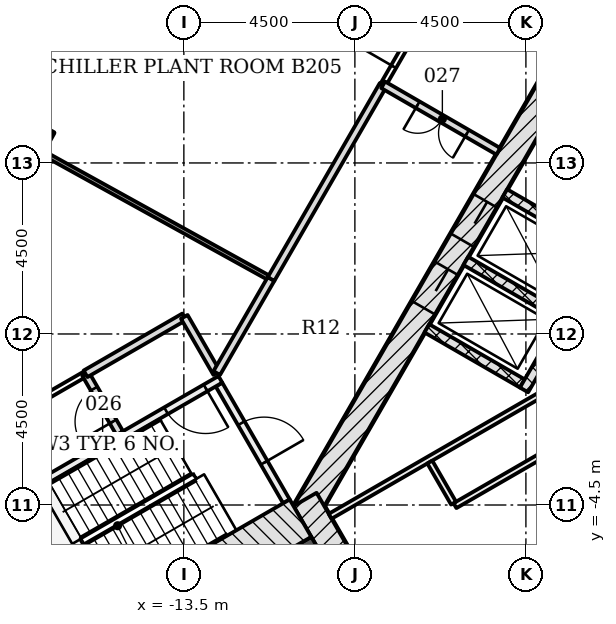
"""IFC4 building model, lengths in metres.
Left out: names, types, materials, properties, quantities, classifications, styles, units other than length and angle.
Written with IfcOpenShell. Run it as: python <this file> out.ifc"""

import sys

from ifc_helpers import new_model, si_unit, direction, frame, frame_2d, origin, origin_2d, place, context, subcontext, project, spatial, polyline, rectangle, outline, extrude, element, fill, save


model = new_model("IFC4")
c1 = context("Model", 3, precision=1e-05, world=origin(), true_north=direction((0.0, 1.0)))
c2 = subcontext(c1, "Body", "Model", "MODEL_VIEW")
j1 = project(units=[si_unit("LENGTHUNIT", "METRE"), si_unit("PLANEANGLEUNIT", "RADIAN")], contexts=[c1])
p1 = place(None, origin())
s1 = spatial("IfcSite", under=j1, at=p1, CompositionType="ELEMENT")
p2 = place(p1, origin())
s2 = spatial("IfcBuilding", under=s1, at=p2, CompositionType="ELEMENT")
p3 = place(p2, frame((0.0, 0.0, -9.0)))
s3 = spatial("IfcBuildingStorey", under=s2, at=p3, CompositionType="ELEMENT", Elevation=-9.0)
p4 = place(p3, frame((-17.739, 5.058, -0.3), z_axis=(0.0, 0.0, 1.0), x_axis=(-0.875152760281, 0.483846717641, 0.0)))
e1 = element("IfcColumn", 1, at=p4, inside=s3, PredefinedType="COLUMN", context=c2, shape_type="SweptSolid", body=[
    extrude(rectangle(XDim=1.2, YDim=1.2, at=origin_2d()), origin(), (0.0, 0.0, 1.0), 4.5),
])
p5 = place(p3, frame((-1.083, 11.281, -0.3), z_axis=(0.0, 0.0, 1.0), x_axis=(-0.500001446645, -0.866024568562, 0.0)))
e2 = element("IfcWall", 2, at=p5, inside=s3, PredefinedType="SHEAR", context=c2, shape_type="SweptSolid", body=[
    extrude(rectangle(XDim=18.458, YDim=0.7, at=frame_2d((9.229, 0.0))), origin(), (0.0, 0.0, 1.0), 4.5),
])
p6 = place(p5, frame((8.979, 0.0, 0.3)))
e3 = element("IfcOpeningElement", 3, at=p6, cuts=e2, PredefinedType="OPENING", context=c2, shape_type="SweptSolid", body=[
    extrude(rectangle(XDim=1.2, YDim=2.1, at=frame_2d((0.6, 1.05))), frame((0.0, 0.36, 0.0), z_axis=(0.0, -1.0, 0.0), x_axis=(1.0, 0.0, 0.0)), (0.0, 0.0, 1.0), 0.72),
])
p7 = place(p5, frame((11.029, 0.0, 0.3)))
e4 = element("IfcOpeningElement", 4, at=p7, cuts=e2, PredefinedType="OPENING", context=c2, shape_type="SweptSolid", body=[
    extrude(rectangle(XDim=1.2, YDim=2.1, at=frame_2d((0.6, 1.05))), frame((0.0, 0.36, 0.0), z_axis=(0.0, -1.0, 0.0), x_axis=(1.0, 0.0, 0.0)), (0.0, 0.0, 1.0), 0.72),
])
p8 = place(p3, frame((-10.311, -4.353, -0.3), z_axis=(0.0, 0.0, 1.0), x_axis=(0.500042739161, -0.866000726912, 0.0)))
e5 = element("IfcWall", 5, at=p8, inside=s3, PredefinedType="SHEAR", context=c2, shape_type="SweptSolid", body=[
    extrude(rectangle(XDim=2.771, YDim=0.7, at=frame_2d((1.386, 0.0))), origin(), (0.0, 0.0, 1.0), 4.5),
])
p9 = place(p3, frame((-9.922, -5.728, -0.3), z_axis=(0.0, 0.0, 1.0), x_axis=(-0.866028046028, -0.499995423472, 0.0)))
e6 = element("IfcWall", 6, at=p9, inside=s3, PredefinedType="SHEAR", context=c2, shape_type="SweptSolid", body=[
    extrude(rectangle(XDim=14.633, YDim=0.9, at=frame_2d((7.316, 0.0))), origin(), (0.0, 0.0, 1.0), 4.5),
])
p10 = place(p9, frame((7.35, 0.0, 0.3)))
e7 = element("IfcOpeningElement", 7, at=p10, cuts=e6, PredefinedType="OPENING", context=c2, shape_type="SweptSolid", body=[
    extrude(rectangle(XDim=1.5, YDim=2.1, at=frame_2d((0.75, 1.05))), frame((0.0, 0.46, 0.0), z_axis=(0.0, -1.0, 0.0), x_axis=(1.0, 0.0, 0.0)), (0.0, 0.0, 1.0), 0.92),
])
for number, where, z_axis, x_axis in (
    (8, (-5.056, 3.699, 0.0), (0.0, 0.0, 1.0), (0.866, -0.5, 0.0)),
    (9, (-6.081, 1.923, 0.0), (0.0, 0.0, 1.0), (0.866, -0.5, 0.0)),
    (10, (-7.106, 0.148, 0.0), (0.0, 0.0, 1.0), (0.866, -0.5, 0.0)),
):
    element("IfcWall", number, at=place(p3, frame(where, z_axis=z_axis, x_axis=x_axis)), inside=s3, PredefinedType="PARTITIONING", context=c2, shape_type="SweptSolid", body=[
        extrude(rectangle(XDim=2.9, YDim=0.25, at=frame_2d((1.45, 0.0))), origin(), (0.0, 0.0, 1.0), 4.2),
    ])
p11 = place(p3, frame((-2.374, 2.294, 0.0), z_axis=(0.0, 0.0, 1.0), x_axis=(-0.499996127374, -0.866027639635, 0.0)))
e11 = element("IfcWall", 11, at=p11, inside=s3, PredefinedType="PARTITIONING", context=c2, shape_type="SweptSolid", body=[
    extrude(rectangle(XDim=4.35, YDim=0.25, at=frame_2d((2.175, 0.0))), origin(), (0.0, 0.0, 1.0), 4.2),
])
p12 = place(p3, frame((-9.651, -4.797, 0.0), z_axis=(0.0, 0.0, 1.0), x_axis=(0.866023073213, 0.500004036646, 0.0)))
e12 = element("IfcWall", 12, at=p12, inside=s3, PredefinedType="PARTITIONING", context=c2, shape_type="SweptSolid", body=[
    extrude(rectangle(XDim=13.785, YDim=0.15, at=frame_2d((6.892, 0.0))), origin(), (0.0, 0.0, 1.0), 4.2),
])
p13 = place(p12, frame((7.934, 0.0, 0.0)))
e13 = element("IfcOpeningElement", 13, at=p13, cuts=e12, PredefinedType="OPENING", context=c2, shape_type="SweptSolid", body=[
    extrude(rectangle(XDim=0.9, YDim=2.1, at=frame_2d((0.45, 1.05))), frame((0.0, 0.085, 0.0), z_axis=(0.0, -1.0, 0.0), x_axis=(1.0, 0.0, 0.0)), (0.0, 0.0, 1.0), 0.17),
])
p14 = place(p3, frame((-6.366, -4.517, 0.0), z_axis=(0.0, 0.0, 1.0), x_axis=(0.866023831006, 0.500002724122, 0.0)))
e14 = element("IfcWall", 14, at=p14, inside=s3, PredefinedType="PARTITIONING", context=c2, shape_type="SweptSolid", body=[
    extrude(rectangle(XDim=14.0, YDim=0.15, at=frame_2d((7.0, 0.0))), origin(), (0.0, 0.0, 1.0), 4.2),
])
p15 = place(p14, frame((4.951, 0.0, 0.0)))
e15 = element("IfcOpeningElement", 15, at=p15, cuts=e14, PredefinedType="OPENING", context=c2, shape_type="SweptSolid", body=[
    extrude(rectangle(XDim=0.9, YDim=2.1, at=frame_2d((0.45, 1.05))), frame((0.0, 0.085, 0.0), z_axis=(0.0, -1.0, 0.0), x_axis=(1.0, 0.0, 0.0)), (0.0, 0.0, 1.0), 0.17),
])
p16 = place(p3, frame((-6.404, -4.452, 0.0), z_axis=(0.0, 0.0, 1.0), x_axis=(-0.500004234368, 0.866022959057, 0.0)))
e16 = element("IfcWall", 16, at=p16, inside=s3, PredefinedType="PARTITIONING", context=c2, shape_type="SweptSolid", body=[
    extrude(rectangle(XDim=1.25, YDim=0.15, at=frame_2d((0.625, 0.0))), origin(), (0.0, 0.0, 1.0), 4.2),
])
p17 = place(p3, frame((-12.576, -1.331, -0.3), z_axis=(0.0, 0.0, 1.0), x_axis=(0.499970499736, -0.8660424351, 0.0)))
e17 = element("IfcWall", 17, at=p17, inside=s3, PredefinedType="SHEAR", context=c2, shape_type="SweptSolid", body=[
    extrude(rectangle(XDim=3.55, YDim=0.2, at=frame_2d((1.775, 0.0))), origin(), (0.0, 0.0, 1.0), 4.5),
])
p18 = place(p17, frame((1.175, 0.0, 0.3)))
e18 = element("IfcOpeningElement", 18, at=p18, cuts=e17, PredefinedType="OPENING", context=c2, shape_type="SweptSolid", body=[
    extrude(rectangle(XDim=1.2, YDim=2.1, at=frame_2d((0.6, 1.05))), frame((0.0, 0.11, 0.0), z_axis=(0.0, -1.0, 0.0), x_axis=(1.0, 0.0, 0.0)), (0.0, 0.0, 1.0), 0.22),
])
p19 = place(p3, frame((-12.539, -1.194, -0.3), z_axis=(0.0, 0.0, 1.0), x_axis=(-0.866045472092, -0.499965239061, 0.0)))
e19 = element("IfcWall", 19, at=p19, inside=s3, PredefinedType="SHEAR", context=c2, shape_type="SweptSolid", body=[
    extrude(rectangle(XDim=5.6, YDim=0.2, at=frame_2d((2.8, 0.0))), origin(), (0.0, 0.0, 1.0), 4.5),
])
p20 = place(p19, frame((0.45, 0.0, 0.3)))
e20 = element("IfcOpeningElement", 20, at=p20, cuts=e19, PredefinedType="OPENING", context=c2, shape_type="SweptSolid", body=[
    extrude(rectangle(XDim=1.2, YDim=2.1, at=frame_2d((0.6, 1.05))), frame((0.0, 0.11, 0.0), z_axis=(0.0, -1.0, 0.0), x_axis=(1.0, 0.0, 0.0)), (0.0, 0.0, 1.0), 0.22),
])
p21 = place(p3, frame((-10.43, -4.847, -0.3), z_axis=(0.0, 0.0, 1.0), x_axis=(-0.866018442252, -0.500012057535, 0.0)))
e21 = element("IfcWall", 21, at=p21, inside=s3, PredefinedType="SHEAR", context=c2, shape_type="SweptSolid", body=[
    extrude(rectangle(XDim=7.2, YDim=1.136, at=frame_2d((3.6, 0.0))), origin(), (0.0, 0.0, 1.0), 4.5),
])
p22 = place(p3, frame((0.0, 0.0, -0.3)))
e22 = element("IfcWall", 22, at=p22, inside=s3, PredefinedType="SHEAR", context=c2, shape_type="SweptSolid", body=[
    extrude(outline(polyline([(-17.439, -3.907), (-18.025, -6.093), (-16.95, -7.955), (-16.777, -7.855), (-17.81, -6.065), (-17.267, -4.039), (-17.339, -4.081), (-17.339, -4.081), (-17.339, -4.081), (-17.339, -4.081), (-17.339, -4.081), (-17.339, -4.081), (-17.339, -4.081), (-17.339, -4.081), (-17.339, -4.081), (-17.339, -4.081), (-17.339, -4.081), (-17.339, -4.081), (-17.339, -4.081), (-17.339, -4.081), (-17.339, -4.081), (-17.339, -4.081), (-17.339, -4.081), (-17.439, -3.907)])), origin(), (0.0, 0.0, 1.0), 4.5),
])
p23 = place(p3, frame((-16.087, -1.049, 0.0), z_axis=(0.0, 0.0, 1.0), x_axis=(-0.866071706002, -0.49991979363, 0.0)))
e23 = element("IfcWall", 23, at=p23, inside=s3, PredefinedType="PARTITIONING", context=c2, shape_type="SweptSolid", body=[
    extrude(rectangle(XDim=5.105, YDim=0.15, at=frame_2d((2.552, 0.0))), origin(), (0.0, 0.0, 1.0), 3.588),
])
p24 = place(p23, frame((1.65, 0.0, 0.0)))
e24 = element("IfcOpeningElement", 24, at=p24, cuts=e23, PredefinedType="OPENING", context=c2, shape_type="SweptSolid", body=[
    extrude(rectangle(XDim=1.8, YDim=2.1, at=frame_2d((0.9, 1.05))), frame((0.0, 0.085, 0.0), z_axis=(0.0, -1.0, 0.0), x_axis=(1.0, 0.0, 0.0)), (0.0, 0.0, 1.0), 0.17),
])
p25 = place(p3, frame((-15.188, -2.607, 0.0), z_axis=(0.0, 0.0, 1.0), x_axis=(-0.500024172624, 0.866011447264, 0.0)))
e25 = element("IfcWall", 25, at=p25, inside=s3, PredefinedType="PARTITIONING", context=c2, shape_type="SweptSolid", body=[
    extrude(rectangle(XDim=1.798, YDim=0.2, at=frame_2d((0.899, 0.0))), origin(), (0.0, 0.0, 1.0), 3.588),
])
p26 = place(p25, frame((0.35, 0.0, 0.0)))
e26 = element("IfcOpeningElement", 26, at=p26, cuts=e25, PredefinedType="OPENING", context=c2, shape_type="SweptSolid", body=[
    extrude(rectangle(XDim=1.0, YDim=2.1, at=frame_2d((0.5, 1.05))), frame((0.0, 0.11, 0.0), z_axis=(0.0, -1.0, 0.0), x_axis=(1.0, 0.0, 0.0)), (0.0, 0.0, 1.0), 0.22),
])
p27 = place(p3, frame((-16.087, -1.048, 0.0), z_axis=(0.0, 0.0, 1.0), x_axis=(0.865988915629, 0.500063194015, 0.0)))
e27 = element("IfcWall", 27, at=p27, inside=s3, PredefinedType="PARTITIONING", context=c2, shape_type="SweptSolid", body=[
    extrude(rectangle(XDim=2.998, YDim=0.2, at=frame_2d((1.499, 0.0))), origin(), (0.0, 0.0, 1.0), 3.588),
])
p28 = place(p3, frame((-13.489, 0.451, 0.0), z_axis=(0.0, 0.0, 1.0), x_axis=(0.500044178772, -0.865999895656, 0.0)))
e28 = element("IfcWall", 28, at=p28, inside=s3, PredefinedType="PARTITIONING", context=c2, shape_type="SweptSolid", body=[
    extrude(rectangle(XDim=1.708, YDim=0.2, at=frame_2d((0.854, 0.0))), origin(), (0.0, 0.0, 1.0), 4.2),
])
p29 = place(p3, frame((-12.635, -1.028, 0.0), z_axis=(0.0, 0.0, 1.0), x_axis=(0.50005725472, 0.865992345233, 0.0)))
e29 = element("IfcWall", 29, at=p29, inside=s3, PredefinedType="PARTITIONING", context=c2, shape_type="SweptSolid", body=[
    extrude(rectangle(XDim=2.862, YDim=0.2, at=frame_2d((1.431, 0.0))), origin(), (0.0, 0.0, 1.0), 3.588),
])
p30 = place(p3, frame((-11.208, 1.446, 0.0), z_axis=(0.0, 0.0, 1.0), x_axis=(-0.875125393946, 0.483896212912, 0.0)))
e30 = element("IfcWall", 30, at=p30, inside=s3, PredefinedType="PARTITIONING", context=c2, shape_type="SweptSolid", body=[
    extrude(rectangle(XDim=6.863, YDim=0.12, at=frame_2d((3.432, 0.0))), origin(), (0.0, 0.0, 1.0), 3.588),
])
p31 = place(p3, frame((-8.256, 6.555, 0.0), z_axis=(0.0, 0.0, 1.0), x_axis=(-0.500042467634, -0.866000883696, 0.0)))
e31 = element("IfcWall", 31, at=p31, inside=s3, PredefinedType="PARTITIONING", context=c2, shape_type="SweptSolid", body=[
    extrude(rectangle(XDim=5.899, YDim=0.2, at=frame_2d((2.95, 0.0))), origin(), (0.0, 0.0, 1.0), 3.588),
])
p32 = place(p3, frame((-5.226, 4.806, 0.0), z_axis=(0.0, 0.0, 1.0), x_axis=(-0.865949687125, 0.500131122175, 0.0)))
e32 = element("IfcWall", 32, at=p32, inside=s3, PredefinedType="PARTITIONING", context=c2, shape_type="SweptSolid", body=[
    extrude(rectangle(XDim=3.499, YDim=0.2, at=frame_2d((1.75, 0.0))), origin(), (0.0, 0.0, 1.0), 4.2),
])
p33 = place(p32, frame((0.95, 0.0, 0.0)))
e33 = element("IfcOpeningElement", 33, at=p33, cuts=e32, PredefinedType="OPENING", context=c2, shape_type="SweptSolid", body=[
    extrude(rectangle(XDim=1.5, YDim=2.1, at=frame_2d((0.75, 1.05))), frame((0.0, 0.11, 0.0), z_axis=(0.0, -1.0, 0.0), x_axis=(1.0, 0.0, 0.0)), (0.0, 0.0, 1.0), 0.22),
])
p34 = place(p3, frame((-8.256, 6.558, 0.0), z_axis=(0.0, 0.0, 1.0), x_axis=(0.500081734942, 0.86597820895, 0.0)))
e34 = element("IfcWall", 34, at=p34, inside=s3, PredefinedType="PARTITIONING", context=c2, shape_type="SweptSolid", body=[
    extrude(rectangle(XDim=2.804, YDim=0.15, at=frame_2d((1.402, 0.0))), origin(), (0.0, 0.0, 1.0), 3.588),
])
p35 = place(p34, frame((0.55, 0.0, 0.0)))
e35 = element("IfcOpeningElement", 35, at=p35, cuts=e34, PredefinedType="OPENING", context=c2, shape_type="SweptSolid", body=[
    extrude(rectangle(XDim=1.8, YDim=2.1, at=frame_2d((0.9, 1.05))), frame((0.0, 0.085, 0.0), z_axis=(0.0, -1.0, 0.0), x_axis=(1.0, 0.0, 0.0)), (0.0, 0.0, 1.0), 0.17),
])
p36 = place(p6, origin())
e36 = element("IfcDoor", 36, at=p36, inside=s3, OperationType="DOUBLE_DOOR_SLIDING", PredefinedType="DOOR", context=c2, shape_type="SweptSolid", body=[
    extrude(rectangle(XDim=1.2, YDim=2.1, at=frame_2d((0.6, 1.05))), frame((0.0, 0.025, 0.0), z_axis=(0.0, -1.0, 0.0), x_axis=(1.0, 0.0, 0.0)), (0.0, 0.0, 1.0), 0.05),
])
fill(e3, e36)
p37 = place(p7, origin())
e37 = element("IfcDoor", 37, at=p37, inside=s3, OperationType="DOUBLE_DOOR_SLIDING", PredefinedType="DOOR", context=c2, shape_type="SweptSolid", body=[
    extrude(rectangle(XDim=1.2, YDim=2.1, at=frame_2d((0.6, 1.05))), frame((0.0, 0.025, 0.0), z_axis=(0.0, -1.0, 0.0), x_axis=(1.0, 0.0, 0.0)), (0.0, 0.0, 1.0), 0.05),
])
fill(e4, e37)
p38 = place(p18, origin())
e38 = element("IfcDoor", 38, at=p38, inside=s3, OperationType="SINGLE_SWING_RIGHT", PredefinedType="DOOR", context=c2, shape_type="SweptSolid", body=[
    extrude(rectangle(XDim=1.2, YDim=2.1, at=frame_2d((0.6, 1.05))), frame((0.0, 0.025, 0.0), z_axis=(0.0, -1.0, 0.0), x_axis=(1.0, 0.0, 0.0)), (0.0, 0.0, 1.0), 0.05),
])
fill(e18, e38)
p39 = place(p20, origin())
e39 = element("IfcDoor", 39, at=p39, inside=s3, OperationType="SINGLE_SWING_LEFT", PredefinedType="DOOR", context=c2, shape_type="SweptSolid", body=[
    extrude(rectangle(XDim=1.2, YDim=2.1, at=frame_2d((0.6, 1.05))), frame((0.0, 0.025, 0.0), z_axis=(0.0, -1.0, 0.0), x_axis=(1.0, 0.0, 0.0)), (0.0, 0.0, 1.0), 0.05),
])
fill(e20, e39)
p40 = place(p35, origin())
e40 = element("IfcDoor", 40, at=p40, inside=s3, OperationType="DOUBLE_DOOR_SINGLE_SWING", PredefinedType="DOOR", context=c2, shape_type="SweptSolid", body=[
    extrude(rectangle(XDim=1.8, YDim=2.1, at=frame_2d((0.9, 1.05))), frame((0.0, 0.025, 0.0), z_axis=(0.0, -1.0, 0.0), x_axis=(1.0, 0.0, 0.0)), (0.0, 0.0, 1.0), 0.05),
])
fill(e35, e40)
p41 = place(p26, origin())
e41 = element("IfcDoor", 41, at=p41, inside=s3, OperationType="SINGLE_SWING_LEFT", PredefinedType="DOOR", context=c2, shape_type="SweptSolid", body=[
    extrude(rectangle(XDim=1.0, YDim=2.1, at=frame_2d((0.5, 1.05))), frame((0.0, 0.025, 0.0), z_axis=(0.0, -1.0, 0.0), x_axis=(1.0, 0.0, 0.0)), (0.0, 0.0, 1.0), 0.05),
])
fill(e26, e41)
p42 = place(p33, origin())
e42 = element("IfcDoor", 42, at=p42, inside=s3, OperationType="DOUBLE_DOOR_SINGLE_SWING", PredefinedType="DOOR", context=c2, shape_type="SweptSolid", body=[
    extrude(rectangle(XDim=1.5, YDim=2.1, at=frame_2d((0.75, 1.05))), frame((0.0, 0.025, 0.0), z_axis=(0.0, -1.0, 0.0), x_axis=(1.0, 0.0, 0.0)), (0.0, 0.0, 1.0), 0.05),
])
fill(e33, e42)
save(model, sys.argv[1])
